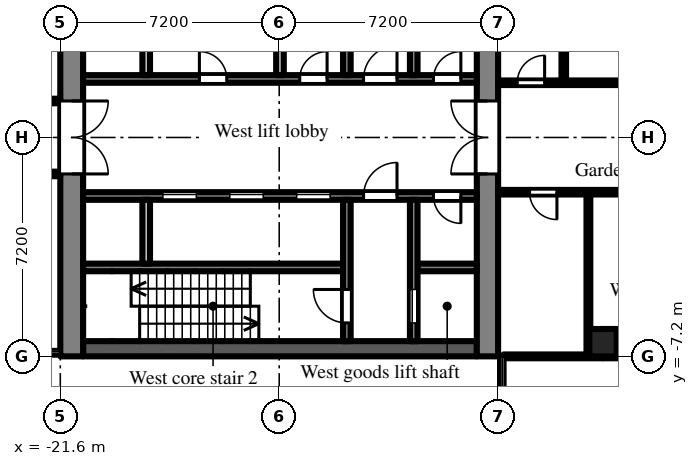
"""IFC4 building model, lengths in metres.
Left out: names, types, materials, properties, quantities, classifications, styles, units other than length and angle.
Written with IfcOpenShell. Run it as: python <this file> out.ifc"""

import sys

from ifc_helpers import new_model, si_unit, direction, frame, frame_2d, origin, origin_2d, place, context, subcontext, project, spatial, rectangle, extrude, element, fill, save


model = new_model("IFC4")
c1 = context("Model", 3, precision=1e-05, world=origin(), true_north=direction((0.0, 1.0)))
c2 = subcontext(c1, "Body", "Model", "MODEL_VIEW")
j1 = project(units=[si_unit("LENGTHUNIT", "METRE"), si_unit("PLANEANGLEUNIT", "RADIAN")], contexts=[c1])
p1 = place(None, origin())
s1 = spatial("IfcSite", under=j1, at=p1, CompositionType="ELEMENT")
p2 = place(p1, origin())
s2 = spatial("IfcBuilding", under=s1, at=p2, CompositionType="ELEMENT")
p3 = place(p2, frame((0.0, 0.0, 7.2)))
s3 = spatial("IfcBuildingStorey", under=s2, at=p3, CompositionType="ELEMENT", Elevation=7.2)
p4 = place(p3, frame((-3.75, -6.75, 0.0), z_axis=(0.0, 0.0, 1.0), x_axis=(1.0, 0.0, 0.0)))
e1 = element("IfcColumn", 1, at=p4, inside=s3, PredefinedType="COLUMN", context=c2, shape_type="SweptSolid", body=[
    extrude(rectangle(XDim=0.9, YDim=0.9, at=origin_2d()), origin(), (0.0, 0.0, 1.0), 4.5),
])
p5 = place(p3, frame((-7.55, -7.2, 0.0), z_axis=(0.0, 0.0, 1.0), x_axis=(0.0, 1.0, 0.0)))
e2 = element("IfcWall", 2, at=p5, inside=s3, PredefinedType="SHEAR", context=c2, shape_type="SweptSolid", body=[
    extrude(rectangle(XDim=14.4, YDim=0.7, at=frame_2d((7.2, 0.0))), origin(), (0.0, 0.0, 1.0), 4.075),
])
p6 = place(p5, frame((6.0, 0.0, 0.0)))
e3 = element("IfcOpeningElement", 3, at=p6, cuts=e2, PredefinedType="OPENING", context=c2, shape_type="SweptSolid", body=[
    extrude(rectangle(XDim=2.4, YDim=2.2, at=frame_2d((1.2, 1.1))), frame((0.0, 0.36, 0.0), z_axis=(0.0, -1.0, 0.0), x_axis=(1.0, 0.0, 0.0)), (0.0, 0.0, 1.0), 0.72),
])
p7 = place(p3, frame((-21.225, -7.2, 0.0), z_axis=(0.0, 0.0, 1.0), x_axis=(0.0, 1.0, 0.0)))
e4 = element("IfcWall", 4, at=p7, inside=s3, PredefinedType="SHEAR", context=c2, shape_type="SweptSolid", body=[
    extrude(rectangle(XDim=14.4, YDim=0.75, at=frame_2d((7.2, 0.0))), origin(), (0.0, 0.0, 1.0), 4.075),
])
p8 = place(p7, frame((6.0, 0.0, 0.0)))
e5 = element("IfcOpeningElement", 5, at=p8, cuts=e4, PredefinedType="OPENING", context=c2, shape_type="SweptSolid", body=[
    extrude(rectangle(XDim=2.4, YDim=2.2, at=frame_2d((1.2, 1.1))), frame((0.0, 0.385, 0.0), z_axis=(0.0, -1.0, 0.0), x_axis=(1.0, 0.0, 0.0)), (0.0, 0.0, 1.0), 0.77),
])
p9 = place(p3, frame((-7.9, 1.925, 0.0), z_axis=(0.0, 0.0, 1.0), x_axis=(-1.0, 0.0, 0.0)))
e6 = element("IfcWall", 6, at=p9, inside=s3, PredefinedType="SHEAR", context=c2, shape_type="SweptSolid", body=[
    extrude(rectangle(XDim=12.95, YDim=0.25, at=frame_2d((6.475, 0.0))), origin(), (0.0, 0.0, 1.0), 4.075),
])
p10 = place(p9, frame((0.525, 0.0, 0.0)))
e7 = element("IfcOpeningElement", 7, at=p10, cuts=e6, PredefinedType="OPENING", context=c2, shape_type="SweptSolid", body=[
    extrude(rectangle(XDim=0.9, YDim=2.1, at=frame_2d((0.45, 1.05))), frame((0.0, 0.135, 0.0), z_axis=(0.0, -1.0, 0.0), x_axis=(1.0, 0.0, 0.0)), (0.0, 0.0, 1.0), 0.27),
])
p11 = place(p9, frame((2.625, 0.0, 0.0)))
e8 = element("IfcOpeningElement", 8, at=p11, cuts=e6, PredefinedType="OPENING", context=c2, shape_type="SweptSolid", body=[
    extrude(rectangle(XDim=1.1, YDim=2.1, at=frame_2d((0.55, 1.05))), frame((0.0, 0.135, 0.0), z_axis=(0.0, -1.0, 0.0), x_axis=(1.0, 0.0, 0.0)), (0.0, 0.0, 1.0), 0.27),
])
p12 = place(p9, frame((4.925, 0.0, 0.0)))
e9 = element("IfcOpeningElement", 9, at=p12, cuts=e6, PredefinedType="OPENING", context=c2, shape_type="SweptSolid", body=[
    extrude(rectangle(XDim=0.9, YDim=2.1, at=frame_2d((0.45, 1.05))), frame((0.0, 0.135, 0.0), z_axis=(0.0, -1.0, 0.0), x_axis=(1.0, 0.0, 0.0)), (0.0, 0.0, 1.0), 0.27),
])
p13 = place(p9, frame((8.225, 0.0, 0.0)))
e10 = element("IfcOpeningElement", 10, at=p13, cuts=e6, PredefinedType="OPENING", context=c2, shape_type="SweptSolid", body=[
    extrude(rectangle(XDim=0.9, YDim=2.1, at=frame_2d((0.45, 1.05))), frame((0.0, 0.135, 0.0), z_axis=(0.0, -1.0, 0.0), x_axis=(1.0, 0.0, 0.0)), (0.0, 0.0, 1.0), 0.27),
])
p14 = place(p3, frame((-9.975, 2.05, 0.0), z_axis=(0.0, 0.0, 1.0), x_axis=(0.0, 1.0, 0.0)))
e11 = element("IfcWall", 11, at=p14, inside=s3, PredefinedType="SHEAR", context=c2, shape_type="SweptSolid", body=[
    extrude(rectangle(XDim=4.65, YDim=0.25, at=frame_2d((2.325, 0.0))), origin(), (0.0, 0.0, 1.0), 4.075),
])
p15 = place(p14, frame((2.95, 0.0, 0.0)))
e12 = element("IfcOpeningElement", 12, at=p15, cuts=e11, PredefinedType="OPENING", context=c2, shape_type="SweptSolid", body=[
    extrude(rectangle(XDim=1.1, YDim=2.1, at=frame_2d((0.55, 1.05))), frame((0.0, 0.135, 0.0), z_axis=(0.0, -1.0, 0.0), x_axis=(1.0, 0.0, 0.0)), (0.0, 0.0, 1.0), 0.27),
])
p16 = place(p3, frame((-12.175, 2.05, 0.0), z_axis=(0.0, 0.0, 1.0), x_axis=(0.0, 1.0, 0.0)))
e13 = element("IfcWall", 13, at=p16, inside=s3, PredefinedType="SHEAR", context=c2, shape_type="SweptSolid", body=[
    extrude(rectangle(XDim=4.65, YDim=0.25, at=frame_2d((2.325, 0.0))), origin(), (0.0, 0.0, 1.0), 4.075),
])
p17 = place(p16, frame((2.95, 0.0, 0.0)))
e14 = element("IfcOpeningElement", 14, at=p17, cuts=e13, PredefinedType="OPENING", context=c2, shape_type="SweptSolid", body=[
    extrude(rectangle(XDim=1.1, YDim=2.1, at=frame_2d((0.55, 1.05))), frame((0.0, 0.135, 0.0), z_axis=(0.0, -1.0, 0.0), x_axis=(1.0, 0.0, 0.0)), (0.0, 0.0, 1.0), 0.27),
])
for number, where, z_axis, x_axis in (
    (15, (-14.375, 2.05, 0.0), (0.0, 0.0, 1.0), (0.0, 1.0, 0.0)),
    (16, (-18.775, 2.05, 0.0), (0.0, 0.0, 1.0), (0.0, 1.0, 0.0)),
):
    element("IfcWall", number, at=place(p3, frame(where, z_axis=z_axis, x_axis=x_axis)), inside=s3, PredefinedType="PARTITIONING", context=c2, shape_type="SweptSolid", body=[
        extrude(rectangle(XDim=2.1, YDim=0.25, at=frame_2d((1.05, 0.0))), origin(), (0.0, 0.0, 1.0), 4.075),
    ])
p18 = place(p3, frame((-7.9, -6.95, 0.0), z_axis=(0.0, 0.0, 1.0), x_axis=(-1.0, 0.0, 0.0)))
e17 = element("IfcWall", 17, at=p18, inside=s3, PredefinedType="SHEAR", context=c2, shape_type="SweptSolid", body=[
    extrude(rectangle(XDim=12.95, YDim=0.5, at=frame_2d((6.475, 0.0))), origin(), (0.0, 0.0, 1.0), 4.075),
])
p19 = place(p3, frame((-7.9, -1.925, 0.0), z_axis=(0.0, 0.0, 1.0), x_axis=(-1.0, 0.0, 0.0)))
e18 = element("IfcWall", 18, at=p19, inside=s3, PredefinedType="SHEAR", context=c2, shape_type="SweptSolid", body=[
    extrude(rectangle(XDim=12.95, YDim=0.25, at=frame_2d((6.475, 0.0))), origin(), (0.0, 0.0, 1.0), 4.075),
])
p20 = place(p19, frame((4.825, 0.0, 0.0)))
e19 = element("IfcOpeningElement", 19, at=p20, cuts=e18, PredefinedType="OPENING", context=c2, shape_type="SweptSolid", body=[
    extrude(rectangle(XDim=1.1, YDim=2.1, at=frame_2d((0.55, 1.05))), frame((0.0, 0.135, 0.0), z_axis=(0.0, -1.0, 0.0), x_axis=(1.0, 0.0, 0.0)), (0.0, 0.0, 1.0), 0.27),
])
p21 = place(p19, frame((7.025, 0.0, 0.0)))
e20 = element("IfcOpeningElement", 20, at=p21, cuts=e18, PredefinedType="OPENING", context=c2, shape_type="SweptSolid", body=[
    extrude(rectangle(XDim=1.1, YDim=2.1, at=frame_2d((0.55, 1.05))), frame((0.0, 0.135, 0.0), z_axis=(0.0, -1.0, 0.0), x_axis=(1.0, 0.0, 0.0)), (0.0, 0.0, 1.0), 0.27),
])
p22 = place(p19, frame((9.225, 0.0, 0.0)))
e21 = element("IfcOpeningElement", 21, at=p22, cuts=e18, PredefinedType="OPENING", context=c2, shape_type="SweptSolid", body=[
    extrude(rectangle(XDim=1.1, YDim=2.1, at=frame_2d((0.55, 1.05))), frame((0.0, 0.135, 0.0), z_axis=(0.0, -1.0, 0.0), x_axis=(1.0, 0.0, 0.0)), (0.0, 0.0, 1.0), 0.27),
])
p23 = place(p19, frame((0.525, 0.0, 0.0)))
e22 = element("IfcOpeningElement", 22, at=p23, cuts=e18, PredefinedType="OPENING", context=c2, shape_type="SweptSolid", body=[
    extrude(rectangle(XDim=0.9, YDim=2.1, at=frame_2d((0.45, 1.05))), frame((0.0, 0.135, 0.0), z_axis=(0.0, -1.0, 0.0), x_axis=(1.0, 0.0, 0.0)), (0.0, 0.0, 1.0), 0.27),
])
p24 = place(p19, frame((2.625, 0.0, 0.0)))
e23 = element("IfcOpeningElement", 23, at=p24, cuts=e18, PredefinedType="OPENING", context=c2, shape_type="SweptSolid", body=[
    extrude(rectangle(XDim=1.1, YDim=2.1, at=frame_2d((0.55, 1.05))), frame((0.0, 0.135, 0.0), z_axis=(0.0, -1.0, 0.0), x_axis=(1.0, 0.0, 0.0)), (0.0, 0.0, 1.0), 0.27),
])
p25 = place(p3, frame((-7.9, -4.275, 0.0), z_axis=(0.0, 0.0, 1.0), x_axis=(-1.0, 0.0, 0.0)))
e24 = element("IfcWall", 24, at=p25, inside=s3, PredefinedType="SHEAR", context=c2, shape_type="SweptSolid", body=[
    extrude(rectangle(XDim=1.95, YDim=0.25, at=frame_2d((0.975, 0.0))), origin(), (0.0, 0.0, 1.0), 4.075),
])
p26 = place(p3, frame((-12.3, -4.275, 0.0), z_axis=(0.0, 0.0, 1.0), x_axis=(-1.0, 0.0, 0.0)))
e25 = element("IfcWall", 25, at=p26, inside=s3, PredefinedType="SHEAR", context=c2, shape_type="SweptSolid", body=[
    extrude(rectangle(XDim=8.55, YDim=0.25, at=frame_2d((4.275, 0.0))), origin(), (0.0, 0.0, 1.0), 4.075),
])
p27 = place(p3, frame((-9.975, -2.05, 0.0), z_axis=(0.0, 0.0, 1.0), x_axis=(0.0, -1.0, 0.0)))
e26 = element("IfcWall", 26, at=p27, inside=s3, PredefinedType="SHEAR", context=c2, shape_type="SweptSolid", body=[
    extrude(rectangle(XDim=4.65, YDim=0.25, at=frame_2d((2.325, 0.0))), origin(), (0.0, 0.0, 1.0), 4.075),
])
p28 = place(p27, frame((2.95, 0.0, 0.0)))
e27 = element("IfcOpeningElement", 27, at=p28, cuts=e26, PredefinedType="OPENING", context=c2, shape_type="SweptSolid", body=[
    extrude(rectangle(XDim=1.1, YDim=2.1, at=frame_2d((0.55, 1.05))), frame((0.0, 0.135, 0.0), z_axis=(0.0, -1.0, 0.0), x_axis=(1.0, 0.0, 0.0)), (0.0, 0.0, 1.0), 0.27),
])
p29 = place(p3, frame((-12.175, -2.05, 0.0), z_axis=(0.0, 0.0, 1.0), x_axis=(0.0, -1.0, 0.0)))
e28 = element("IfcWall", 28, at=p29, inside=s3, PredefinedType="SHEAR", context=c2, shape_type="SweptSolid", body=[
    extrude(rectangle(XDim=4.65, YDim=0.25, at=frame_2d((2.325, 0.0))), origin(), (0.0, 0.0, 1.0), 4.075),
])
p30 = place(p29, frame((2.95, 0.0, 0.0)))
e29 = element("IfcOpeningElement", 29, at=p30, cuts=e28, PredefinedType="OPENING", context=c2, shape_type="SweptSolid", body=[
    extrude(rectangle(XDim=1.1, YDim=2.1, at=frame_2d((0.55, 1.05))), frame((0.0, 0.135, 0.0), z_axis=(0.0, -1.0, 0.0), x_axis=(1.0, 0.0, 0.0)), (0.0, 0.0, 1.0), 0.27),
])
p31 = place(p3, frame((-18.775, -2.05, 0.0), z_axis=(0.0, 0.0, 1.0), x_axis=(0.0, -1.0, 0.0)))
e30 = element("IfcWall", 30, at=p31, inside=s3, PredefinedType="PARTITIONING", context=c2, shape_type="SweptSolid", body=[
    extrude(rectangle(XDim=2.1, YDim=0.25, at=frame_2d((1.05, 0.0))), origin(), (0.0, 0.0, 1.0), 4.075),
])
p32 = place(p3, frame((-34.8, -1.2, 0.0), z_axis=(0.0, 0.0, 1.0), x_axis=(1.0, 0.0, 0.0)))
e31 = element("IfcWall", 31, at=p32, inside=s3, PredefinedType="PARTITIONING", context=c2, shape_type="SweptSolid", body=[
    extrude(rectangle(XDim=13.2, YDim=0.15, at=frame_2d((6.6, 0.0))), origin(), (0.0, 0.0, 1.0), 4.075),
])
p33 = place(p32, frame((7.95, 0.0, 0.0)))
e32 = element("IfcOpeningElement", 32, at=p33, cuts=e31, PredefinedType="OPENING", context=c2, shape_type="SweptSolid", body=[
    extrude(rectangle(XDim=0.9, YDim=2.1, at=frame_2d((0.45, 1.05))), frame((0.0, 0.085, 0.0), z_axis=(0.0, -1.0, 0.0), x_axis=(1.0, 0.0, 0.0)), (0.0, 0.0, 1.0), 0.17),
])
p34 = place(p32, frame((1.35, 0.0, 0.0)))
e33 = element("IfcOpeningElement", 33, at=p34, cuts=e31, PredefinedType="OPENING", context=c2, shape_type="SweptSolid", body=[
    extrude(rectangle(XDim=0.9, YDim=2.1, at=frame_2d((0.45, 1.05))), frame((0.0, 0.085, 0.0), z_axis=(0.0, -1.0, 0.0), x_axis=(1.0, 0.0, 0.0)), (0.0, 0.0, 1.0), 0.17),
])
p35 = place(p3, frame((-34.8, 1.2, 0.0), z_axis=(0.0, 0.0, 1.0), x_axis=(1.0, 0.0, 0.0)))
e34 = element("IfcWall", 34, at=p35, inside=s3, PredefinedType="PARTITIONING", context=c2, shape_type="SweptSolid", body=[
    extrude(rectangle(XDim=13.2, YDim=0.15, at=frame_2d((6.6, 0.0))), origin(), (0.0, 0.0, 1.0), 4.075),
])
p36 = place(p35, frame((10.35, 0.0, 0.0)))
e35 = element("IfcOpeningElement", 35, at=p36, cuts=e34, PredefinedType="OPENING", context=c2, shape_type="SweptSolid", body=[
    extrude(rectangle(XDim=0.9, YDim=2.1, at=frame_2d((0.45, 1.05))), frame((0.0, 0.085, 0.0), z_axis=(0.0, -1.0, 0.0), x_axis=(1.0, 0.0, 0.0)), (0.0, 0.0, 1.0), 0.17),
])
p37 = place(p35, frame((3.75, 0.0, 0.0)))
e36 = element("IfcOpeningElement", 36, at=p37, cuts=e34, PredefinedType="OPENING", context=c2, shape_type="SweptSolid", body=[
    extrude(rectangle(XDim=0.9, YDim=2.1, at=frame_2d((0.45, 1.05))), frame((0.0, 0.085, 0.0), z_axis=(0.0, -1.0, 0.0), x_axis=(1.0, 0.0, 0.0)), (0.0, 0.0, 1.0), 0.17),
])
p38 = place(p3, frame((-7.2, -1.8, 0.0), z_axis=(0.0, 0.0, 1.0), x_axis=(1.0, 0.0, 0.0)))
e37 = element("IfcWall", 37, at=p38, inside=s3, PredefinedType="PARTITIONING", context=c2, shape_type="SweptSolid", body=[
    extrude(rectangle(XDim=5.475, YDim=0.15, at=frame_2d((2.737, 0.0))), origin(), (0.0, 0.0, 1.0), 4.075),
])
p39 = place(p38, frame((1.035, 0.0, 0.0)))
e38 = element("IfcOpeningElement", 38, at=p39, cuts=e37, PredefinedType="OPENING", context=c2, shape_type="SweptSolid", body=[
    extrude(rectangle(XDim=0.9, YDim=2.1, at=frame_2d((0.45, 1.05))), frame((0.0, 0.085, 0.0), z_axis=(0.0, -1.0, 0.0), x_axis=(1.0, 0.0, 0.0)), (0.0, 0.0, 1.0), 0.17),
])
p40 = place(p3, frame((-7.2, 1.8, 0.0), z_axis=(0.0, 0.0, 1.0), x_axis=(1.0, 0.0, 0.0)))
e39 = element("IfcWall", 39, at=p40, inside=s3, PredefinedType="PARTITIONING", context=c2, shape_type="SweptSolid", body=[
    extrude(rectangle(XDim=5.475, YDim=0.15, at=frame_2d((2.737, 0.0))), origin(), (0.0, 0.0, 1.0), 4.075),
])
p41 = place(p40, frame((0.63, 0.0, 0.0)))
e40 = element("IfcOpeningElement", 40, at=p41, cuts=e39, PredefinedType="OPENING", context=c2, shape_type="SweptSolid", body=[
    extrude(rectangle(XDim=0.9, YDim=2.1, at=frame_2d((0.45, 1.05))), frame((0.0, 0.085, 0.0), z_axis=(0.0, -1.0, 0.0), x_axis=(1.0, 0.0, 0.0)), (0.0, 0.0, 1.0), 0.17),
])
p42 = place(p3, frame((-7.02, -7.2, 0.0), z_axis=(0.0, 0.0, 1.0), x_axis=(1.0, 0.0, 0.0)))
e41 = element("IfcWall", 41, at=p42, inside=s3, PredefinedType="PARTITIONING", context=c2, shape_type="SweptSolid", body=[
    extrude(rectangle(XDim=3.27, YDim=0.125, at=frame_2d((1.635, 0.0))), origin(), (0.0, 0.0, 1.0), 3.6),
])
p43 = place(p3, frame((-5.04, 1.875, 0.0), z_axis=(0.0, 0.0, 1.0), x_axis=(0.0, 1.0, 0.0)))
e42 = element("IfcWall", 42, at=p43, inside=s3, PredefinedType="PARTITIONING", context=c2, shape_type="SweptSolid", body=[
    extrude(rectangle(XDim=5.25, YDim=0.15, at=frame_2d((2.625, 0.0))), origin(), (0.0, 0.0, 1.0), 4.075),
])
p44 = place(p3, frame((-4.23, -7.137, 0.0), z_axis=(0.0, 0.0, 1.0), x_axis=(0.0, 1.0, 0.0)))
e43 = element("IfcWall", 43, at=p44, inside=s3, PredefinedType="PARTITIONING", context=c2, shape_type="SweptSolid", body=[
    extrude(rectangle(XDim=5.262, YDim=0.125, at=frame_2d((2.631, 0.0))), origin(), (0.0, 0.0, 1.0), 4.075),
])
p45 = place(p3, frame((-3.75, -7.2, 0.0), z_axis=(0.0, 0.0, 1.0), x_axis=(1.0, 0.0, 0.0)))
e44 = element("IfcWall", 44, at=p45, inside=s3, PredefinedType="PARTITIONING", context=c2, shape_type="SweptSolid", body=[
    extrude(rectangle(XDim=1.95, YDim=0.125, at=frame_2d((0.975, 0.0))), origin(), (0.0, 0.0, 1.0), 4.075),
])
p46 = place(p20, origin())
e45 = element("IfcDoor", 45, at=p46, inside=s3, OperationType="SLIDING_TO_LEFT", PredefinedType="DOOR", context=c2, shape_type="SweptSolid", body=[
    extrude(rectangle(XDim=1.1, YDim=2.1, at=frame_2d((0.55, 1.05))), frame((0.0, 0.025, 0.0), z_axis=(0.0, -1.0, 0.0), x_axis=(1.0, 0.0, 0.0)), (0.0, 0.0, 1.0), 0.05),
])
fill(e19, e45)
p47 = place(p21, origin())
e46 = element("IfcDoor", 46, at=p47, inside=s3, OperationType="SLIDING_TO_LEFT", PredefinedType="DOOR", context=c2, shape_type="SweptSolid", body=[
    extrude(rectangle(XDim=1.1, YDim=2.1, at=frame_2d((0.55, 1.05))), frame((0.0, 0.025, 0.0), z_axis=(0.0, -1.0, 0.0), x_axis=(1.0, 0.0, 0.0)), (0.0, 0.0, 1.0), 0.05),
])
fill(e20, e46)
p48 = place(p22, origin())
e47 = element("IfcDoor", 47, at=p48, inside=s3, OperationType="SLIDING_TO_LEFT", PredefinedType="DOOR", context=c2, shape_type="SweptSolid", body=[
    extrude(rectangle(XDim=1.1, YDim=2.1, at=frame_2d((0.55, 1.05))), frame((0.0, 0.025, 0.0), z_axis=(0.0, -1.0, 0.0), x_axis=(1.0, 0.0, 0.0)), (0.0, 0.0, 1.0), 0.05),
])
fill(e21, e47)
p49 = place(p28, origin())
e48 = element("IfcDoor", 48, at=p49, inside=s3, OperationType="SLIDING_TO_LEFT", PredefinedType="DOOR", context=c2, shape_type="SweptSolid", body=[
    extrude(rectangle(XDim=1.1, YDim=2.1, at=frame_2d((0.55, 1.05))), frame((0.0, 0.025, 0.0), z_axis=(0.0, -1.0, 0.0), x_axis=(1.0, 0.0, 0.0)), (0.0, 0.0, 1.0), 0.05),
])
fill(e27, e48)
p50 = place(p30, frame((1.1, 0.0, 0.0), z_axis=(0.0, 0.0, 1.0), x_axis=(-1.0, 0.0, 0.0)))
e49 = element("IfcDoor", 49, at=p50, inside=s3, OperationType="SINGLE_SWING_RIGHT", PredefinedType="DOOR", context=c2, shape_type="SweptSolid", body=[
    extrude(rectangle(XDim=1.1, YDim=2.1, at=frame_2d((0.55, 1.05))), frame((0.0, 0.025, 0.0), z_axis=(0.0, -1.0, 0.0), x_axis=(1.0, 0.0, 0.0)), (0.0, 0.0, 1.0), 0.05),
])
fill(e29, e49)
p51 = place(p10, frame((0.9, 0.0, 0.0), z_axis=(0.0, 0.0, 1.0), x_axis=(-1.0, 0.0, 0.0)))
e50 = element("IfcDoor", 50, at=p51, inside=s3, OperationType="SINGLE_SWING_RIGHT", PredefinedType="DOOR", context=c2, shape_type="SweptSolid", body=[
    extrude(rectangle(XDim=0.9, YDim=2.1, at=frame_2d((0.45, 1.05))), frame((0.0, 0.025, 0.0), z_axis=(0.0, -1.0, 0.0), x_axis=(1.0, 0.0, 0.0)), (0.0, 0.0, 1.0), 0.05),
])
fill(e7, e50)
p52 = place(p23, origin())
e51 = element("IfcDoor", 51, at=p52, inside=s3, OperationType="SINGLE_SWING_LEFT", PredefinedType="DOOR", context=c2, shape_type="SweptSolid", body=[
    extrude(rectangle(XDim=0.9, YDim=2.1, at=frame_2d((0.45, 1.05))), frame((0.0, 0.025, 0.0), z_axis=(0.0, -1.0, 0.0), x_axis=(1.0, 0.0, 0.0)), (0.0, 0.0, 1.0), 0.05),
])
fill(e22, e51)
p53 = place(p11, frame((1.1, 0.0, 0.0), z_axis=(0.0, 0.0, 1.0), x_axis=(-1.0, 0.0, 0.0)))
e52 = element("IfcDoor", 52, at=p53, inside=s3, OperationType="SINGLE_SWING_RIGHT", PredefinedType="DOOR", context=c2, shape_type="SweptSolid", body=[
    extrude(rectangle(XDim=1.1, YDim=2.1, at=frame_2d((0.55, 1.05))), frame((0.0, 0.025, 0.0), z_axis=(0.0, -1.0, 0.0), x_axis=(1.0, 0.0, 0.0)), (0.0, 0.0, 1.0), 0.05),
])
fill(e8, e52)
p54 = place(p24, frame((1.1, 0.0, 0.0), z_axis=(0.0, 0.0, 1.0), x_axis=(-1.0, 0.0, 0.0)))
e53 = element("IfcDoor", 53, at=p54, inside=s3, OperationType="SINGLE_SWING_RIGHT", PredefinedType="DOOR", context=c2, shape_type="SweptSolid", body=[
    extrude(rectangle(XDim=1.1, YDim=2.1, at=frame_2d((0.55, 1.05))), frame((0.0, 0.025, 0.0), z_axis=(0.0, -1.0, 0.0), x_axis=(1.0, 0.0, 0.0)), (0.0, 0.0, 1.0), 0.05),
])
fill(e23, e53)
p55 = place(p6, origin())
e54 = element("IfcDoor", 54, at=p55, inside=s3, OperationType="DOUBLE_DOOR_DOUBLE_SWING", PredefinedType="DOOR", context=c2, shape_type="SweptSolid", body=[
    extrude(rectangle(XDim=2.4, YDim=2.2, at=frame_2d((1.2, 1.1))), frame((0.0, 0.025, 0.0), z_axis=(0.0, -1.0, 0.0), x_axis=(1.0, 0.0, 0.0)), (0.0, 0.0, 1.0), 0.05),
])
fill(e3, e54)
p56 = place(p8, frame((2.4, 0.0, 0.0), z_axis=(0.0, 0.0, 1.0), x_axis=(-1.0, 0.0, 0.0)))
e55 = element("IfcDoor", 55, at=p56, inside=s3, OperationType="DOUBLE_DOOR_DOUBLE_SWING", PredefinedType="DOOR", context=c2, shape_type="SweptSolid", body=[
    extrude(rectangle(XDim=2.4, YDim=2.2, at=frame_2d((1.2, 1.1))), frame((0.0, 0.025, 0.0), z_axis=(0.0, -1.0, 0.0), x_axis=(1.0, 0.0, 0.0)), (0.0, 0.0, 1.0), 0.05),
])
fill(e5, e55)
p57 = place(p12, frame((0.9, 0.0, 0.0), z_axis=(0.0, 0.0, 1.0), x_axis=(-1.0, 0.0, 0.0)))
e56 = element("IfcDoor", 56, at=p57, inside=s3, OperationType="SINGLE_SWING_RIGHT", PredefinedType="DOOR", context=c2, shape_type="SweptSolid", body=[
    extrude(rectangle(XDim=0.9, YDim=2.1, at=frame_2d((0.45, 1.05))), frame((0.0, 0.025, 0.0), z_axis=(0.0, -1.0, 0.0), x_axis=(1.0, 0.0, 0.0)), (0.0, 0.0, 1.0), 0.05),
])
fill(e9, e56)
p58 = place(p13, frame((0.9, 0.0, 0.0), z_axis=(0.0, 0.0, 1.0), x_axis=(-1.0, 0.0, 0.0)))
e57 = element("IfcDoor", 57, at=p58, inside=s3, OperationType="SINGLE_SWING_LEFT", PredefinedType="DOOR", context=c2, shape_type="SweptSolid", body=[
    extrude(rectangle(XDim=0.9, YDim=2.1, at=frame_2d((0.45, 1.05))), frame((0.0, 0.025, 0.0), z_axis=(0.0, -1.0, 0.0), x_axis=(1.0, 0.0, 0.0)), (0.0, 0.0, 1.0), 0.05),
])
fill(e10, e57)
p59 = place(p41, origin())
e58 = element("IfcDoor", 58, at=p59, inside=s3, OperationType="SINGLE_SWING_RIGHT", PredefinedType="DOOR", context=c2, shape_type="SweptSolid", body=[
    extrude(rectangle(XDim=0.9, YDim=2.1, at=frame_2d((0.45, 1.05))), frame((0.0, 0.025, 0.0), z_axis=(0.0, -1.0, 0.0), x_axis=(1.0, 0.0, 0.0)), (0.0, 0.0, 1.0), 0.05),
])
fill(e40, e58)
p60 = place(p39, frame((0.9, 0.0, 0.0), z_axis=(0.0, 0.0, 1.0), x_axis=(-1.0, 0.0, 0.0)))
e59 = element("IfcDoor", 59, at=p60, inside=s3, OperationType="SINGLE_SWING_LEFT", PredefinedType="DOOR", context=c2, shape_type="SweptSolid", body=[
    extrude(rectangle(XDim=0.9, YDim=2.1, at=frame_2d((0.45, 1.05))), frame((0.0, 0.025, 0.0), z_axis=(0.0, -1.0, 0.0), x_axis=(1.0, 0.0, 0.0)), (0.0, 0.0, 1.0), 0.05),
])
fill(e38, e59)
save(model, sys.argv[1])
